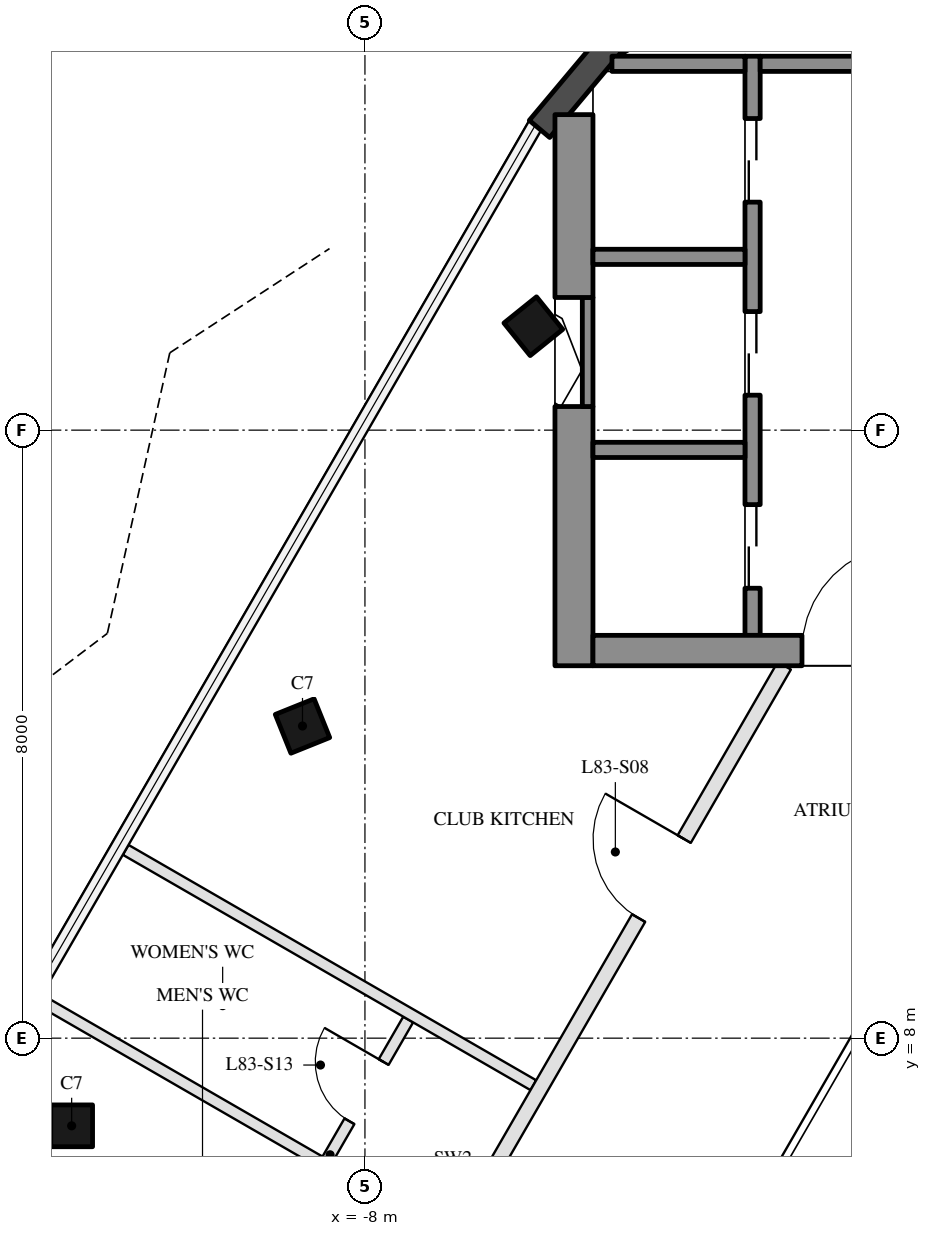
"""IFC4 building model, lengths in metres.
Left out: names, types, materials, properties, quantities, classifications, styles, units other than length and angle.
Written with IfcOpenShell. Run it as: python <this file> out.ifc"""

import sys

from ifc_helpers import new_model, si_unit, direction, frame, frame_2d, origin, origin_2d, place, context, subcontext, project, spatial, rectangle, hollow_rectangle, extrude, boolean, halfspace, element, fill, save


model = new_model("IFC4")
c1 = context("Model", 3, precision=1e-05, world=origin(), true_north=direction((0.0, 1.0)))
c2 = subcontext(c1, "Body", "Model", "MODEL_VIEW")
j1 = project(units=[si_unit("LENGTHUNIT", "METRE"), si_unit("PLANEANGLEUNIT", "RADIAN")], contexts=[c1])
p1 = place(None, origin())
s1 = spatial("IfcSite", under=j1, at=p1, CompositionType="ELEMENT")
p2 = place(p1, origin())
s2 = spatial("IfcBuilding", under=s1, at=p2, CompositionType="ELEMENT")
p3 = place(p2, frame((0.0, 0.0, 331.8)))
s3 = spatial("IfcBuildingStorey", under=s2, at=p3, CompositionType="ELEMENT", Elevation=331.8)
p4 = place(p3, frame((-5.784, 17.367, 0.0), z_axis=(0.04020096267, -0.1037685016, 0.993788700216), x_axis=(0.501318150771, 0.862445141844, 0.069774558517)))
e1 = element("IfcColumn", 1, at=p4, inside=s3, PredefinedType="COLUMN", context=c2, shape_type="SweptSolid", body=[
    boolean("DIFFERENCE", boolean("DIFFERENCE", extrude(hollow_rectangle(XDim=0.55, YDim=0.55, WallThickness=0.025, at=origin_2d()), origin(), (0.0, 0.0, 1.0), 6.541), halfspace(frame((0.0, 0.0, 0.018), z_axis=(0.0, 0.0, 1.0), x_axis=(1.0, 0.0, 0.0)), True)), halfspace(frame((0.0, 0.0, 6.517), z_axis=(0.0, 0.0, 1.0), x_axis=(1.0, 0.0, 0.0)), False)),
])
p5 = place(p3, frame((-8.822, 12.107, 0.0), z_axis=(0.057738040202, -0.073705749506, 0.995607242442), x_axis=(0.501061537175, 0.864705350939, 0.034957002453)))
e2 = element("IfcColumn", 2, at=p5, inside=s3, PredefinedType="COLUMN", context=c2, shape_type="SweptSolid", body=[
    boolean("DIFFERENCE", boolean("DIFFERENCE", extrude(hollow_rectangle(XDim=0.55, YDim=0.55, WallThickness=0.025, at=origin_2d()), origin(), (0.0, 0.0, 1.0), 6.529), halfspace(frame((0.0, 0.0, 0.016), z_axis=(0.0, 0.0, 1.0), x_axis=(1.0, 0.0, 0.0)), True)), halfspace(frame((0.0, 0.0, 6.509), z_axis=(0.0, 0.0, 1.0), x_axis=(1.0, 0.0, 0.0)), False)),
])
p6 = place(p3, frame((-11.859, 6.847, 0.0), z_axis=(0.075247573053, -0.043479701585, 0.99621650172), x_axis=(-0.500351454226, -0.865822396472, 4.550396e-06)))
e3 = element("IfcColumn", 3, at=p6, inside=s3, PredefinedType="COLUMN", context=c2, shape_type="SweptSolid", body=[
    boolean("DIFFERENCE", boolean("DIFFERENCE", extrude(hollow_rectangle(XDim=0.55, YDim=0.55, WallThickness=0.025, at=origin_2d()), origin(), (0.0, 0.0, 1.0), 6.525), halfspace(frame((0.0, 0.0, 0.015), z_axis=(0.0, 0.0, 1.0), x_axis=(1.0, 0.0, 0.0)), True)), halfspace(frame((0.0, 0.0, 6.506), z_axis=(0.0, 0.0, 1.0), x_axis=(1.0, 0.0, 0.0)), False)),
])
p7 = place(p3, frame((-3.534, 21.783, 0.0), z_axis=(0.0, 0.0, 1.0), x_axis=(-0.866055463174, -0.499947931995, 0.0)))
e4 = element("IfcWall", 4, at=p7, inside=s3, PredefinedType="SOLIDWALL", context=c2, shape_type="SweptSolid", body=[
    extrude(rectangle(XDim=1.469, YDim=0.35, at=frame_2d((0.734, 0.0))), origin(), (0.0, 0.0, 1.0), 6.25),
])
p8 = place(p3, frame((-4.76, 21.088, 0.0), z_axis=(0.0, 0.0, 1.0), x_axis=(-0.642747598678, -0.766078014561, 0.0)))
e5 = element("IfcWall", 5, at=p8, inside=s3, PredefinedType="SOLIDWALL", context=c2, shape_type="SweptSolid", body=[
    extrude(rectangle(XDim=1.469, YDim=0.35, at=frame_2d((0.734, 0.0))), origin(), (0.0, 0.0, 1.0), 6.25),
])
p9 = place(p3, frame((-5.25, 12.9, 0.0), z_axis=(0.0, 0.0, 1.0), x_axis=(0.0, 1.0, 0.0)))
e6 = element("IfcWall", 6, at=p9, inside=s3, PredefinedType="SHEAR", context=c2, shape_type="SweptSolid", body=[
    extrude(rectangle(XDim=3.411, YDim=0.5, at=frame_2d((1.706, 0.0))), origin(), (0.0, 0.0, 1.0), 6.25),
])
p10 = place(p3, frame((-5.07, 16.311, 0.0), z_axis=(0.0, 0.0, 1.0), x_axis=(0.0, 1.0, 0.0)))
e7 = element("IfcWall", 7, at=p10, inside=s3, PredefinedType="SHEAR", context=c2, shape_type="SweptSolid", body=[
    extrude(rectangle(XDim=1.435, YDim=0.14, at=frame_2d((0.717, 0.0))), origin(), (0.0, 0.0, 1.0), 6.25),
])
p11 = place(p3, frame((-5.25, 17.746, 0.0), z_axis=(0.0, 0.0, 1.0), x_axis=(0.0, 1.0, 0.0)))
e8 = element("IfcWall", 8, at=p11, inside=s3, PredefinedType="SHEAR", context=c2, shape_type="SweptSolid", body=[
    extrude(rectangle(XDim=2.406, YDim=0.5, at=frame_2d((1.203, 0.0))), origin(), (0.0, 0.0, 1.0), 6.25),
])
p12 = place(p3, frame((-2.9, 13.3, 0.0), z_axis=(0.0, 0.0, 1.0), x_axis=(0.0, 1.0, 0.0)))
e9 = element("IfcWall", 9, at=p12, inside=s3, PredefinedType="SHEAR", context=c2, shape_type="SweptSolid", body=[
    extrude(rectangle(XDim=7.62, YDim=0.2, at=frame_2d((3.81, 0.0))), origin(), (0.0, 0.0, 1.0), 6.25),
])
p13 = place(p12, frame((0.62, 0.0, 0.0)))
e10 = element("IfcOpeningElement", 10, at=p13, cuts=e9, PredefinedType="OPENING", context=c2, shape_type="SweptSolid", body=[
    extrude(rectangle(XDim=1.1, YDim=2.1, at=frame_2d((0.55, 1.05))), frame((0.0, 0.11, 0.0), z_axis=(0.0, -1.0, 0.0), x_axis=(1.0, 0.0, 0.0)), (0.0, 0.0, 1.0), 0.22),
])
p14 = place(p12, frame((3.16, 0.0, 0.0)))
e11 = element("IfcOpeningElement", 11, at=p14, cuts=e9, PredefinedType="OPENING", context=c2, shape_type="SweptSolid", body=[
    extrude(rectangle(XDim=1.1, YDim=2.1, at=frame_2d((0.55, 1.05))), frame((0.0, 0.11, 0.0), z_axis=(0.0, -1.0, 0.0), x_axis=(1.0, 0.0, 0.0)), (0.0, 0.0, 1.0), 0.22),
])
p15 = place(p12, frame((5.7, 0.0, 0.0)))
e12 = element("IfcOpeningElement", 12, at=p15, cuts=e9, PredefinedType="OPENING", context=c2, shape_type="SweptSolid", body=[
    extrude(rectangle(XDim=1.1, YDim=2.1, at=frame_2d((0.55, 1.05))), frame((0.0, 0.11, 0.0), z_axis=(0.0, -1.0, 0.0), x_axis=(1.0, 0.0, 0.0)), (0.0, 0.0, 1.0), 0.22),
])
p16 = place(p3, frame((-1.0, 20.82, 0.0), z_axis=(0.0, 0.0, 1.0), x_axis=(-1.0, 0.0, 0.0)))
e13 = element("IfcWall", 13, at=p16, inside=s3, PredefinedType="SHEAR", context=c2, shape_type="SweptSolid", body=[
    extrude(rectangle(XDim=1.8, YDim=0.2, at=frame_2d((0.9, 0.0))), origin(), (0.0, 0.0, 1.0), 6.25),
])
for number, where, z_axis, x_axis in (
    (14, (-3.0, 15.74, 0.0), (0.0, 0.0, 1.0), (-1.0, 0.0, 0.0)),
    (15, (-3.0, 18.28, 0.0), (0.0, 0.0, 1.0), (-1.0, 0.0, 0.0)),
):
    element("IfcWall", number, at=place(p3, frame(where, z_axis=z_axis, x_axis=x_axis)), inside=s3, PredefinedType="SHEAR", context=c2, shape_type="SweptSolid", body=[
        extrude(rectangle(XDim=2.0, YDim=0.2, at=frame_2d((1.0, 0.0))), origin(), (0.0, 0.0, 1.0), 6.25),
    ])
p17 = place(p3, frame((-3.0, 20.82, 0.0), z_axis=(0.0, 0.0, 1.0), x_axis=(-1.0, 0.0, 0.0)))
e16 = element("IfcWall", 16, at=p17, inside=s3, PredefinedType="SHEAR", context=c2, shape_type="SweptSolid", body=[
    extrude(rectangle(XDim=1.75, YDim=0.2, at=frame_2d((0.875, 0.0))), origin(), (0.0, 0.0, 1.0), 6.25),
])
p18 = place(p3, frame((2.45, 13.1, 0.0), z_axis=(0.0, 0.0, 1.0), x_axis=(-1.0, 0.0, 0.0)))
e17 = element("IfcWall", 17, at=p18, inside=s3, PredefinedType="SHEAR", context=c2, shape_type="SweptSolid", body=[
    extrude(rectangle(XDim=7.45, YDim=0.4, at=frame_2d((3.725, 0.0))), origin(), (0.0, 0.0, 1.0), 6.25),
])
p19 = place(p18, frame((1.0, 0.0, 0.0)))
e18 = element("IfcOpeningElement", 18, at=p19, cuts=e17, PredefinedType="OPENING", context=c2, shape_type="SweptSolid", body=[
    extrude(rectangle(XDim=1.1, YDim=2.1, at=frame_2d((0.55, 1.05))), frame((0.0, 0.21, 0.0), z_axis=(0.0, -1.0, 0.0), x_axis=(1.0, 0.0, 0.0)), (0.0, 0.0, 1.0), 0.42),
])
p20 = place(p18, frame((3.3, 0.0, 0.0)))
e19 = element("IfcOpeningElement", 19, at=p20, cuts=e17, PredefinedType="OPENING", context=c2, shape_type="SweptSolid", body=[
    extrude(rectangle(XDim=1.4, YDim=2.1, at=frame_2d((0.7, 1.05))), frame((0.0, 0.21, 0.0), z_axis=(0.0, -1.0, 0.0), x_axis=(1.0, 0.0, 0.0)), (0.0, 0.0, 1.0), 0.42),
])
p21 = place(p3, frame((-7.431, 8.245, 0.0), z_axis=(0.0, 0.0, 1.0), x_axis=(-0.500014519185, -0.866017020967, 0.0)))
e20 = element("IfcWall", 20, at=p21, inside=s3, PredefinedType="PARTITIONING", context=c2, shape_type="SweptSolid", body=[
    extrude(rectangle(XDim=6.85, YDim=0.15, at=frame_2d((3.425, 0.0))), origin(), (0.0, 0.0, 1.0), 5.85),
])
p22 = place(p21, frame((5.167, 0.0, 0.0)))
e21 = element("IfcOpeningElement", 21, at=p22, cuts=e20, PredefinedType="OPENING", context=c2, shape_type="SweptSolid", body=[
    extrude(rectangle(XDim=1.0, YDim=2.1, at=frame_2d((0.5, 1.05))), frame((0.0, 0.085, 0.0), z_axis=(0.0, -1.0, 0.0), x_axis=(1.0, 0.0, 0.0)), (0.0, 0.0, 1.0), 0.17),
])
p23 = place(p21, frame((2.887, 0.0, 0.0)))
e22 = element("IfcOpeningElement", 22, at=p23, cuts=e20, PredefinedType="OPENING", context=c2, shape_type="SweptSolid", body=[
    extrude(rectangle(XDim=0.9, YDim=2.1, at=frame_2d((0.45, 1.05))), frame((0.0, 0.085, 0.0), z_axis=(0.0, -1.0, 0.0), x_axis=(1.0, 0.0, 0.0)), (0.0, 0.0, 1.0), 0.17),
])
p24 = place(p21, frame((0.646, 0.0, 0.0)))
e23 = element("IfcOpeningElement", 23, at=p24, cuts=e20, PredefinedType="OPENING", context=c2, shape_type="SweptSolid", body=[
    extrude(rectangle(XDim=0.9, YDim=2.1, at=frame_2d((0.45, 1.05))), frame((0.0, 0.085, 0.0), z_axis=(0.0, -1.0, 0.0), x_axis=(1.0, 0.0, 0.0)), (0.0, 0.0, 1.0), 0.17),
])
p25 = place(p3, frame((-11.148, 10.478, 0.0), z_axis=(0.0, 0.0, 1.0), x_axis=(0.866022127522, -0.500005674609, 0.0)))
e24 = element("IfcWall", 24, at=p25, inside=s3, PredefinedType="PARTITIONING", context=c2, shape_type="SweptSolid", body=[
    extrude(rectangle(XDim=6.193, YDim=0.15, at=frame_2d((3.097, 0.0))), origin(), (0.0, 0.0, 1.0), 5.85),
])
p26 = place(p3, frame((-12.285, 8.508, 0.0), z_axis=(0.0, 0.0, 1.0), x_axis=(0.866023350811, -0.500003555838, 0.0)))
e25 = element("IfcWall", 25, at=p26, inside=s3, PredefinedType="PARTITIONING", context=c2, shape_type="SweptSolid", body=[
    extrude(rectangle(XDim=4.26, YDim=0.15, at=frame_2d((2.13, 0.0))), origin(), (0.0, 0.0, 1.0), 5.85),
])
p27 = place(p3, frame((-13.423, 6.537, 0.0), z_axis=(0.0, 0.0, 1.0), x_axis=(0.866037676697, -0.499978742089, 0.0)))
e26 = element("IfcWall", 26, at=p27, inside=s3, PredefinedType="PARTITIONING", context=c2, shape_type="SweptSolid", body=[
    extrude(rectangle(XDim=4.26, YDim=0.15, at=frame_2d((2.13, 0.0))), origin(), (0.0, 0.0, 1.0), 5.85),
])
p28 = place(p3, frame((-2.482, 12.9, 0.0), z_axis=(0.0, 0.0, 1.0), x_axis=(-0.50000478328, -0.866022642139, 0.0)))
e27 = element("IfcWall", 27, at=p28, inside=s3, PredefinedType="PARTITIONING", context=c2, shape_type="SweptSolid", body=[
    extrude(rectangle(XDim=19.861, YDim=0.2, at=frame_2d((9.931, 0.0))), origin(), (0.0, 0.0, 1.0), 5.85),
])
p29 = place(p28, frame((2.634, 0.0, 0.0)))
e28 = element("IfcOpeningElement", 28, at=p29, cuts=e27, PredefinedType="OPENING", context=c2, shape_type="SweptSolid", body=[
    extrude(rectangle(XDim=1.2, YDim=2.1, at=frame_2d((0.6, 1.05))), frame((0.0, 0.11, 0.0), z_axis=(0.0, -1.0, 0.0), x_axis=(1.0, 0.0, 0.0)), (0.0, 0.0, 1.0), 0.22),
])
p30 = place(p28, frame((15.877, 0.0, 0.0)))
e29 = element("IfcOpeningElement", 29, at=p30, cuts=e27, PredefinedType="OPENING", context=c2, shape_type="SweptSolid", body=[
    extrude(rectangle(XDim=1.5, YDim=2.1, at=frame_2d((0.75, 1.05))), frame((0.0, 0.11, 0.0), z_axis=(0.0, -1.0, 0.0), x_axis=(1.0, 0.0, 0.0)), (0.0, 0.0, 1.0), 0.22),
])
p31 = place(p28, frame((9.43, 0.0, 0.0)))
e30 = element("IfcOpeningElement", 30, at=p31, cuts=e27, PredefinedType="OPENING", context=c2, shape_type="SweptSolid", body=[
    extrude(rectangle(XDim=1.0, YDim=2.1, at=frame_2d((0.5, 1.05))), frame((0.0, 0.11, 0.0), z_axis=(0.0, -1.0, 0.0), x_axis=(1.0, 0.0, 0.0)), (0.0, 0.0, 1.0), 0.22),
])
p32 = place(p13, origin())
e31 = element("IfcDoor", 31, at=p32, inside=s3, OperationType="DOUBLE_DOOR_SLIDING", PredefinedType="DOOR", context=c2, shape_type="SweptSolid", body=[
    extrude(rectangle(XDim=1.1, YDim=2.1, at=frame_2d((0.55, 1.05))), frame((0.0, 0.025, 0.0), z_axis=(0.0, -1.0, 0.0), x_axis=(1.0, 0.0, 0.0)), (0.0, 0.0, 1.0), 0.05),
])
fill(e10, e31)
p33 = place(p14, origin())
e32 = element("IfcDoor", 32, at=p33, inside=s3, OperationType="DOUBLE_DOOR_SLIDING", PredefinedType="DOOR", context=c2, shape_type="SweptSolid", body=[
    extrude(rectangle(XDim=1.1, YDim=2.1, at=frame_2d((0.55, 1.05))), frame((0.0, 0.025, 0.0), z_axis=(0.0, -1.0, 0.0), x_axis=(1.0, 0.0, 0.0)), (0.0, 0.0, 1.0), 0.05),
])
fill(e11, e32)
p34 = place(p15, origin())
e33 = element("IfcDoor", 33, at=p34, inside=s3, OperationType="DOUBLE_DOOR_SLIDING", PredefinedType="DOOR", context=c2, shape_type="SweptSolid", body=[
    extrude(rectangle(XDim=1.1, YDim=2.1, at=frame_2d((0.55, 1.05))), frame((0.0, 0.025, 0.0), z_axis=(0.0, -1.0, 0.0), x_axis=(1.0, 0.0, 0.0)), (0.0, 0.0, 1.0), 0.05),
])
fill(e12, e33)
p35 = place(p20, frame((1.4, 0.0, 0.0), z_axis=(0.0, 0.0, 1.0), x_axis=(-1.0, 0.0, 0.0)))
e34 = element("IfcDoor", 34, at=p35, inside=s3, OperationType="DOUBLE_DOOR_SINGLE_SWING", PredefinedType="DOOR", context=c2, shape_type="SweptSolid", body=[
    extrude(rectangle(XDim=1.4, YDim=2.1, at=frame_2d((0.7, 1.05))), frame((0.0, 0.025, 0.0), z_axis=(0.0, -1.0, 0.0), x_axis=(1.0, 0.0, 0.0)), (0.0, 0.0, 1.0), 0.05),
])
fill(e19, e34)
p36 = place(p29, frame((1.2, 0.0, 0.0), z_axis=(0.0, 0.0, 1.0), x_axis=(-1.0, 0.0, 0.0)))
e35 = element("IfcDoor", 35, at=p36, inside=s3, OperationType="SINGLE_SWING_RIGHT", PredefinedType="DOOR", context=c2, shape_type="SweptSolid", body=[
    extrude(rectangle(XDim=1.2, YDim=2.1, at=frame_2d((0.6, 1.05))), frame((0.0, 0.025, 0.0), z_axis=(0.0, -1.0, 0.0), x_axis=(1.0, 0.0, 0.0)), (0.0, 0.0, 1.0), 0.05),
])
fill(e28, e35)
p37 = place(p24, frame((0.9, 0.0, 0.0), z_axis=(0.0, 0.0, 1.0), x_axis=(-1.0, 0.0, 0.0)))
e36 = element("IfcDoor", 36, at=p37, inside=s3, OperationType="SINGLE_SWING_RIGHT", PredefinedType="DOOR", context=c2, shape_type="SweptSolid", body=[
    extrude(rectangle(XDim=0.9, YDim=2.1, at=frame_2d((0.45, 1.05))), frame((0.0, 0.025, 0.0), z_axis=(0.0, -1.0, 0.0), x_axis=(1.0, 0.0, 0.0)), (0.0, 0.0, 1.0), 0.05),
])
fill(e23, e36)
save(model, sys.argv[1])
